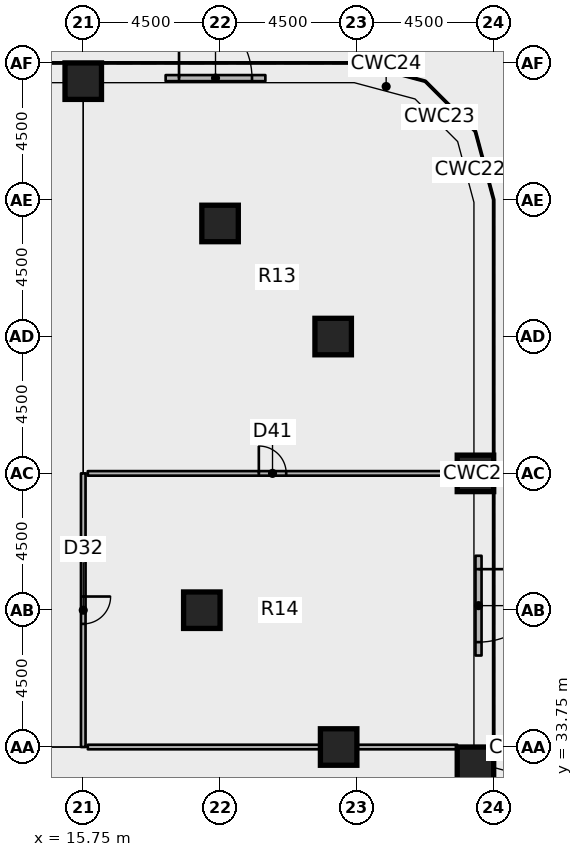
"""IFC4 building model, lengths in metres.
Left out: names, types, materials, properties, quantities, classifications, styles, units other than length and angle.
Written with IfcOpenShell. Run it as: python <this file> out.ifc"""

import sys

from ifc_helpers import new_model, si_unit, direction, frame, frame_2d, origin, origin_2d, place, context, subcontext, project, spatial, rectangle, extrude, element, fill, save


model = new_model("IFC4")
c1 = context("Model", 3, precision=1e-05, world=origin(), true_north=direction((0.0, 1.0)))
c2 = subcontext(c1, "Body", "Model", "MODEL_VIEW")
j1 = project(units=[si_unit("LENGTHUNIT", "METRE"), si_unit("PLANEANGLEUNIT", "RADIAN")], contexts=[c1])
p1 = place(None, origin())
s1 = spatial("IfcSite", under=j1, at=p1, CompositionType="ELEMENT")
p2 = place(p1, origin())
s2 = spatial("IfcBuilding", under=s1, at=p2, CompositionType="ELEMENT")
p3 = place(p2, origin())
s3 = spatial("IfcBuildingStorey", under=s2, at=p3, CompositionType="ELEMENT", Elevation=0.0)
for number, where, z_axis, x_axis in (
    (1, (15.75, 55.65, 0.0), (0.0, 0.0, 1.0), (1.0, 0.0, 0.0)),
    (2, (19.65, 38.25, 0.0), (0.0, 0.0, 1.0), (1.0, 0.0, 0.0)),
    (3, (20.25, 50.97, 0.0), (0.0, 0.0, 1.0), (1.0, 0.0, 0.0)),
    (4, (24.15, 33.75, 0.0), (0.0, 0.0, 1.0), (1.0, 0.0, 0.0)),
    (5, (23.97, 47.25, 0.0), (0.0, 0.0, 1.0), (1.0, 0.0, 0.0)),
    (6, (28.65, 33.15, 0.0), (0.0, 0.0, 1.0), (1.0, 0.0, 0.0)),
    (7, (28.65, 42.75, 0.0), (0.0, 0.0, 1.0), (1.0, 0.0, 0.0)),
):
    element("IfcColumn", number, at=place(p3, frame(where, z_axis=z_axis, x_axis=x_axis)), inside=s3, PredefinedType="COLUMN", context=c2, shape_type="SweptSolid", body=[
        extrude(rectangle(XDim=1.2, YDim=1.2, at=origin_2d()), origin(), (0.0, 0.0, 1.0), 6.55),
    ])
p4 = place(p3, frame((18.46, 55.75, 0.0), z_axis=(0.0, 0.0, 1.0), x_axis=(1.0, 0.0, 0.0)))
e8 = element("IfcWall", 8, at=p4, inside=s3, PredefinedType="SOLIDWALL", context=c2, shape_type="SweptSolid", body=[
    extrude(rectangle(XDim=3.28, YDim=0.2, at=frame_2d((1.64, 0.0))), origin(), (0.0, 0.0, 1.0), 5.6),
])
p5 = place(p4, frame((0.44, 0.0, 0.0)))
e9 = element("IfcOpeningElement", 9, at=p5, cuts=e8, PredefinedType="OPENING", context=c2, shape_type="SweptSolid", body=[
    extrude(rectangle(XDim=2.4, YDim=2.7, at=frame_2d((1.2, 1.35))), frame((0.0, 0.11, 0.0), z_axis=(0.0, -1.0, 0.0), x_axis=(1.0, 0.0, 0.0)), (0.0, 0.0, 1.0), 0.22),
])
p6 = place(p3, frame((28.75, 40.04, 0.0), z_axis=(0.0, 0.0, 1.0), x_axis=(0.0, -1.0, 0.0)))
e10 = element("IfcWall", 10, at=p6, inside=s3, PredefinedType="SOLIDWALL", context=c2, shape_type="SweptSolid", body=[
    extrude(rectangle(XDim=3.28, YDim=0.2, at=frame_2d((1.64, 0.0))), origin(), (0.0, 0.0, 1.0), 5.6),
])
p7 = place(p6, frame((0.44, 0.0, 0.0)))
e11 = element("IfcOpeningElement", 11, at=p7, cuts=e10, PredefinedType="OPENING", context=c2, shape_type="SweptSolid", body=[
    extrude(rectangle(XDim=2.4, YDim=2.7, at=frame_2d((1.2, 1.35))), frame((0.0, 0.11, 0.0), z_axis=(0.0, -1.0, 0.0), x_axis=(1.0, 0.0, 0.0)), (0.0, 0.0, 1.0), 0.22),
])
p8 = place(p3, frame((15.75, 42.75, 0.0), z_axis=(0.0, 0.0, 1.0), x_axis=(0.0, -1.0, 0.0)))
e12 = element("IfcWall", 12, at=p8, inside=s3, PredefinedType="PARTITIONING", context=c2, shape_type="SweptSolid", body=[
    extrude(rectangle(XDim=9.0, YDim=0.15, at=frame_2d((4.5, 0.0))), origin(), (0.0, 0.0, 1.0), 6.55),
])
p9 = place(p8, frame((4.05, 0.0, 0.0)))
e13 = element("IfcOpeningElement", 13, at=p9, cuts=e12, PredefinedType="OPENING", context=c2, shape_type="SweptSolid", body=[
    extrude(rectangle(XDim=0.9, YDim=2.1, at=frame_2d((0.45, 1.05))), frame((0.0, 0.085, 0.0), z_axis=(0.0, -1.0, 0.0), x_axis=(1.0, 0.0, 0.0)), (0.0, 0.0, 1.0), 0.17),
])
p10 = place(p3, frame((15.9, 42.75, 0.0), z_axis=(0.0, 0.0, 1.0), x_axis=(1.0, 0.0, 0.0)))
e14 = element("IfcWall", 14, at=p10, inside=s3, PredefinedType="PARTITIONING", context=c2, shape_type="SweptSolid", body=[
    extrude(rectangle(XDim=12.15, YDim=0.15, at=frame_2d((6.075, 0.0))), origin(), (0.0, 0.0, 1.0), 6.55),
])
p11 = place(p10, frame((5.625, 0.0, 0.0)))
e15 = element("IfcOpeningElement", 15, at=p11, cuts=e14, PredefinedType="OPENING", context=c2, shape_type="SweptSolid", body=[
    extrude(rectangle(XDim=0.9, YDim=2.1, at=frame_2d((0.45, 1.05))), frame((0.0, 0.085, 0.0), z_axis=(0.0, -1.0, 0.0), x_axis=(1.0, 0.0, 0.0)), (0.0, 0.0, 1.0), 0.17),
])
p12 = place(p3, frame((28.05, 33.75, 0.0), z_axis=(0.0, 0.0, 1.0), x_axis=(-1.0, 0.0, 0.0)))
e16 = element("IfcWall", 16, at=p12, inside=s3, PredefinedType="PARTITIONING", context=c2, shape_type="SweptSolid", body=[
    extrude(rectangle(XDim=3.3, YDim=0.15, at=frame_2d((1.65, 0.0))), origin(), (0.0, 0.0, 1.0), 6.55),
])
p13 = place(p3, frame((23.55, 33.75, 0.0), z_axis=(0.0, 0.0, 1.0), x_axis=(-1.0, 0.0, 0.0)))
e17 = element("IfcWall", 17, at=p13, inside=s3, PredefinedType="PARTITIONING", context=c2, shape_type="SweptSolid", body=[
    extrude(rectangle(XDim=7.65, YDim=0.15, at=frame_2d((3.825, 0.0))), origin(), (0.0, 0.0, 1.0), 6.55),
])
p14 = place(p5, origin())
e18 = element("IfcDoor", 18, at=p14, inside=s3, OperationType="SINGLE_SWING_LEFT", PredefinedType="DOOR", context=c2, shape_type="SweptSolid", body=[
    extrude(rectangle(XDim=2.4, YDim=2.7, at=frame_2d((1.2, 1.35))), frame((0.0, 0.025, 0.0), z_axis=(0.0, -1.0, 0.0), x_axis=(1.0, 0.0, 0.0)), (0.0, 0.0, 1.0), 0.05),
])
fill(e9, e18)
p15 = place(p7, origin())
e19 = element("IfcDoor", 19, at=p15, inside=s3, OperationType="SINGLE_SWING_LEFT", PredefinedType="DOOR", context=c2, shape_type="SweptSolid", body=[
    extrude(rectangle(XDim=2.4, YDim=2.7, at=frame_2d((1.2, 1.35))), frame((0.0, 0.025, 0.0), z_axis=(0.0, -1.0, 0.0), x_axis=(1.0, 0.0, 0.0)), (0.0, 0.0, 1.0), 0.05),
])
fill(e11, e19)
p16 = place(p9, origin())
e20 = element("IfcDoor", 20, at=p16, inside=s3, OperationType="SINGLE_SWING_LEFT", PredefinedType="DOOR", context=c2, shape_type="SweptSolid", body=[
    extrude(rectangle(XDim=0.9, YDim=2.1, at=frame_2d((0.45, 1.05))), frame((0.0, 0.025, 0.0), z_axis=(0.0, -1.0, 0.0), x_axis=(1.0, 0.0, 0.0)), (0.0, 0.0, 1.0), 0.05),
])
fill(e13, e20)
p17 = place(p11, origin())
e21 = element("IfcDoor", 21, at=p17, inside=s3, OperationType="SINGLE_SWING_LEFT", PredefinedType="DOOR", context=c2, shape_type="SweptSolid", body=[
    extrude(rectangle(XDim=0.9, YDim=2.1, at=frame_2d((0.45, 1.05))), frame((0.0, 0.025, 0.0), z_axis=(0.0, -1.0, 0.0), x_axis=(1.0, 0.0, 0.0)), (0.0, 0.0, 1.0), 0.05),
])
fill(e15, e21)
save(model, sys.argv[1])
